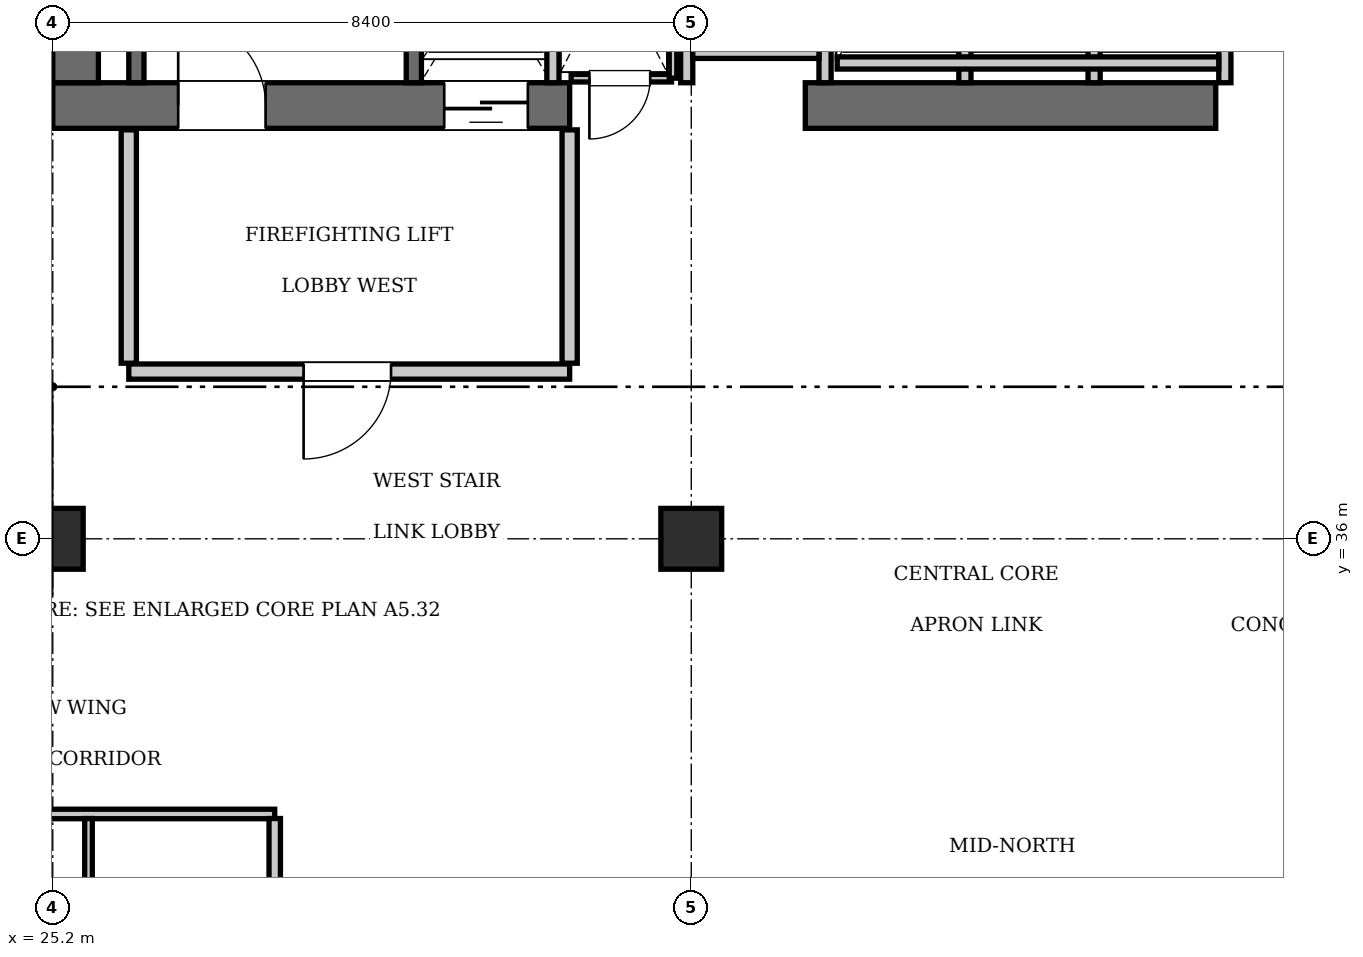
"""IFC4 building model, lengths in metres.
Left out: names, types, materials, properties, quantities, classifications, styles, units other than length and angle.
Written with IfcOpenShell. Run it as: python <this file> out.ifc"""

import sys

from ifc_helpers import new_model, si_unit, direction, frame, frame_2d, origin, origin_2d, place, context, subcontext, project, spatial, rectangle, extrude, element, fill, save


model = new_model("IFC4")
c1 = context("Model", 3, precision=1e-05, world=origin(), true_north=direction((0.0, 1.0)))
c2 = subcontext(c1, "Body", "Model", "MODEL_VIEW")
j1 = project(units=[si_unit("LENGTHUNIT", "METRE"), si_unit("PLANEANGLEUNIT", "RADIAN")], contexts=[c1])
p1 = place(None, origin())
s1 = spatial("IfcSite", under=j1, at=p1, CompositionType="ELEMENT")
p2 = place(p1, origin())
s2 = spatial("IfcBuilding", under=s1, at=p2, CompositionType="ELEMENT")
p3 = place(p2, frame((0.0, 0.0, 308.7)))
s3 = spatial("IfcBuildingStorey", under=s2, at=p3, CompositionType="ELEMENT", Elevation=308.7)
p4 = place(p3, frame((25.2, 41.7, 0.0), z_axis=(0.0, 0.0, 1.0), x_axis=(1.0, 0.0, 0.0)))
e1 = element("IfcWall", 1, at=p4, inside=s3, PredefinedType="SHEAR", context=c2, shape_type="SweptSolid", body=[
    extrude(rectangle(XDim=6.8, YDim=0.6, at=frame_2d((3.4, 0.0))), origin(), (0.0, 0.0, 1.0), 3.85),
])
p5 = place(p4, frame((1.65, 0.0, 0.0)))
e2 = element("IfcOpeningElement", 2, at=p5, cuts=e1, PredefinedType="OPENING", context=c2, shape_type="SweptSolid", body=[
    extrude(rectangle(XDim=1.15, YDim=2.15, at=frame_2d((0.575, 1.075))), frame((0.0, 0.31, 0.0), z_axis=(0.0, -1.0, 0.0), x_axis=(1.0, 0.0, 0.0)), (0.0, 0.0, 1.0), 0.62),
])
p6 = place(p4, frame((5.15, 0.0, 0.0)))
e3 = element("IfcOpeningElement", 3, at=p6, cuts=e1, PredefinedType="OPENING", context=c2, shape_type="SweptSolid", body=[
    extrude(rectangle(XDim=1.1, YDim=2.2, at=frame_2d((0.55, 1.1))), frame((0.0, 0.31, 0.0), z_axis=(0.0, -1.0, 0.0), x_axis=(1.0, 0.0, 0.0)), (0.0, 0.0, 1.0), 0.62),
])
p7 = place(p3, frame((35.1, 41.7, 0.0), z_axis=(0.0, 0.0, 1.0), x_axis=(1.0, 0.0, 0.0)))
e4 = element("IfcWall", 4, at=p7, inside=s3, PredefinedType="SHEAR", context=c2, shape_type="SweptSolid", body=[
    extrude(rectangle(XDim=5.4, YDim=0.6, at=frame_2d((2.7, 0.0))), origin(), (0.0, 0.0, 1.0), 3.85),
])
p8 = place(p3, frame((25.5, 42.0, 0.0), z_axis=(0.0, 0.0, 1.0), x_axis=(0.0, 1.0, 0.0)))
e5 = element("IfcWall", 5, at=p8, inside=s3, PredefinedType="SHEAR", context=c2, shape_type="SweptSolid", body=[
    extrude(rectangle(XDim=2.2, YDim=0.6, at=frame_2d((1.1, 0.0))), origin(), (0.0, 0.0, 1.0), 3.85),
])
for number, where, z_axis, x_axis in (
    (6, (25.2, 36.0, 0.0), (0.0, 0.0, 1.0), (1.0, 0.0, 0.0)),
    (7, (33.6, 36.0, 0.0), (0.0, 0.0, 1.0), (1.0, 0.0, 0.0)),
):
    element("IfcColumn", number, at=place(p3, frame(where, z_axis=z_axis, x_axis=x_axis)), inside=s3, PredefinedType="COLUMN", context=c2, shape_type="SweptSolid", body=[
        extrude(rectangle(XDim=0.8, YDim=0.8, at=origin_2d()), origin(), (0.0, 0.0, 1.0), 3.85),
    ])
p9 = place(p3, frame((29.95, 42.0, 0.0), z_axis=(0.0, 0.0, 1.0), x_axis=(0.0, 1.0, 0.0)))
e8 = element("IfcWall", 8, at=p9, inside=s3, PredefinedType="SOLIDWALL", context=c2, shape_type="SweptSolid", body=[
    extrude(rectangle(XDim=9.15, YDim=0.2, at=frame_2d((4.575, 0.0))), origin(), (0.0, 0.0, 1.0), 3.61),
])
p10 = place(p3, frame((26.3, 42.0, 0.0), z_axis=(0.0, 0.0, 1.0), x_axis=(0.0, 1.0, 0.0)))
e9 = element("IfcWall", 9, at=p10, inside=s3, PredefinedType="SOLIDWALL", context=c2, shape_type="SweptSolid", body=[
    extrude(rectangle(XDim=9.12, YDim=0.2, at=frame_2d((4.56, 0.0))), origin(), (0.0, 0.0, 1.0), 3.61),
])
p11 = place(p3, frame((31.78, 42.0, 0.0), z_axis=(0.0, 0.0, 1.0), x_axis=(0.0, 1.0, 0.0)))
e10 = element("IfcWall", 10, at=p11, inside=s3, PredefinedType="SOLIDWALL", context=c2, shape_type="SweptSolid", body=[
    extrude(rectangle(XDim=2.74, YDim=0.16, at=frame_2d((1.37, 0.0))), origin(), (0.0, 0.0, 1.0), 3.61),
])
for number, where, z_axis, x_axis in (
    (11, (37.2, 42.0, 0.0), (0.0, 0.0, 1.0), (0.0, 1.0, 0.0)),
    (12, (38.9, 42.0, 0.0), (0.0, 0.0, 1.0), (0.0, 1.0, 0.0)),
    (13, (40.62, 42.0, 0.0), (0.0, 0.0, 1.0), (0.0, 1.0, 0.0)),
):
    element("IfcWall", number, at=place(p3, frame(where, z_axis=z_axis, x_axis=x_axis)), inside=s3, PredefinedType="SOLIDWALL", context=c2, shape_type="SweptSolid", body=[
        extrude(rectangle(XDim=2.35, YDim=0.16, at=frame_2d((1.175, 0.0))), origin(), (0.0, 0.0, 1.0), 3.61),
    ])
p12 = place(p3, frame((35.52, 42.26, 0.0), z_axis=(0.0, 0.0, 1.0), x_axis=(1.0, 0.0, 0.0)))
e14 = element("IfcWall", 14, at=p12, inside=s3, PredefinedType="SOLIDWALL", context=c2, shape_type="SweptSolid", body=[
    extrude(rectangle(XDim=5.02, YDim=0.16, at=frame_2d((2.51, 0.0))), origin(), (0.0, 0.0, 1.0), 3.61),
])
for number, where, z_axis, x_axis in (
    (15, (33.54, 42.0, 0.0), (0.0, 0.0, 1.0), (0.0, 1.0, 0.0)),
    (16, (35.36, 42.0, 0.0), (0.0, 0.0, 1.0), (0.0, 1.0, 0.0)),
):
    element("IfcWall", number, at=place(p3, frame(where, z_axis=z_axis, x_axis=x_axis)), inside=s3, PredefinedType="SOLIDWALL", context=c2, shape_type="SweptSolid", body=[
        extrude(rectangle(XDim=2.4, YDim=0.16, at=frame_2d((1.2, 0.0))), origin(), (0.0, 0.0, 1.0), 3.61),
    ])
p13 = place(p3, frame((33.62, 42.4, 0.0), z_axis=(0.0, 0.0, 1.0), x_axis=(1.0, 0.0, 0.0)))
e17 = element("IfcWall", 17, at=p13, inside=s3, PredefinedType="SOLIDWALL", context=c2, shape_type="SweptSolid", body=[
    extrude(rectangle(XDim=1.66, YDim=0.16, at=frame_2d((0.83, 0.0))), origin(), (0.0, 0.0, 1.0), 3.61),
])
p14 = place(p3, frame((26.2, 38.2, 0.0), z_axis=(0.0, 0.0, 1.0), x_axis=(1.0, 0.0, 0.0)))
e18 = element("IfcWall", 18, at=p14, inside=s3, PredefinedType="PARTITIONING", context=c2, shape_type="SweptSolid", body=[
    extrude(rectangle(XDim=5.8, YDim=0.2, at=frame_2d((2.9, 0.0))), origin(), (0.0, 0.0, 1.0), 3.61),
])
p15 = place(p14, frame((2.3, 0.0, 0.0)))
e19 = element("IfcOpeningElement", 19, at=p15, cuts=e18, PredefinedType="OPENING", context=c2, shape_type="SweptSolid", body=[
    extrude(rectangle(XDim=1.15, YDim=2.15, at=frame_2d((0.575, 1.075))), frame((0.0, 0.11, 0.0), z_axis=(0.0, -1.0, 0.0), x_axis=(1.0, 0.0, 0.0)), (0.0, 0.0, 1.0), 0.22),
])
for number, where, z_axis, x_axis in (
    (20, (26.2, 38.31, 0.0), (0.0, 0.0, 1.0), (0.0, 1.0, 0.0)),
    (21, (32.0, 38.31, 0.0), (0.0, 0.0, 1.0), (0.0, 1.0, 0.0)),
):
    element("IfcWall", number, at=place(p3, frame(where, z_axis=z_axis, x_axis=x_axis)), inside=s3, PredefinedType="PARTITIONING", context=c2, shape_type="SweptSolid", body=[
        extrude(rectangle(XDim=3.07, YDim=0.2, at=frame_2d((1.535, 0.0))), origin(), (0.0, 0.0, 1.0), 3.61),
    ])
p16 = place(p3, frame((32.02, 42.06, 0.0), z_axis=(0.0, 0.0, 1.0), x_axis=(1.0, 0.0, 0.0)))
e22 = element("IfcWall", 22, at=p16, inside=s3, PredefinedType="PARTITIONING", context=c2, shape_type="SweptSolid", body=[
    extrude(rectangle(XDim=1.32, YDim=0.1, at=frame_2d((0.66, 0.0))), origin(), (0.0, 0.0, 1.0), 3.61),
])
p17 = place(p16, frame((0.24, 0.0, 0.0)))
e23 = element("IfcOpeningElement", 23, at=p17, cuts=e22, PredefinedType="OPENING", context=c2, shape_type="SweptSolid", body=[
    extrude(rectangle(XDim=0.8, YDim=2.05, at=frame_2d((0.4, 1.025))), frame((0.0, 0.06, 0.0), z_axis=(0.0, -1.0, 0.0), x_axis=(1.0, 0.0, 0.0)), (0.0, 0.0, 1.0), 0.12),
])
p18 = place(p3, frame((33.36, 42.06, 0.0), z_axis=(0.0, 0.0, 1.0), x_axis=(0.0, 1.0, 0.0)))
e24 = element("IfcWall", 24, at=p18, inside=s3, PredefinedType="PARTITIONING", context=c2, shape_type="SweptSolid", body=[
    extrude(rectangle(XDim=2.88, YDim=0.1, at=frame_2d((1.44, 0.0))), origin(), (0.0, 0.0, 1.0), 3.61),
])
p19 = place(p3, frame((15.5, 32.38, 0.0), z_axis=(0.0, 0.0, 1.0), x_axis=(1.0, 0.0, 0.0)))
e25 = element("IfcWall", 25, at=p19, inside=s3, PredefinedType="PARTITIONING", context=c2, shape_type="SweptSolid", body=[
    extrude(rectangle(XDim=12.62, YDim=0.125, at=frame_2d((6.31, 0.0))), origin(), (0.0, 0.0, 1.0), 3.61),
])
p20 = place(p3, frame((28.12, 30.43, 0.0), z_axis=(0.0, 0.0, 1.0), x_axis=(0.0, 1.0, 0.0)))
e26 = element("IfcWall", 26, at=p20, inside=s3, PredefinedType="PARTITIONING", context=c2, shape_type="SweptSolid", body=[
    extrude(rectangle(XDim=1.89, YDim=0.15, at=frame_2d((0.945, 0.0))), origin(), (0.0, 0.0, 1.0), 3.61),
])
p21 = place(p3, frame((25.67, 30.43, 0.0), z_axis=(0.0, 0.0, 1.0), x_axis=(0.0, 1.0, 0.0)))
e27 = element("IfcWall", 27, at=p21, inside=s3, PredefinedType="PARTITIONING", context=c2, shape_type="SweptSolid", body=[
    extrude(rectangle(XDim=1.89, YDim=0.1, at=frame_2d((0.945, 0.0))), origin(), (0.0, 0.0, 1.0), 3.61),
])
p22 = place(p5, origin())
e28 = element("IfcDoor", 28, at=p22, inside=s3, OperationType="SINGLE_SWING_LEFT", PredefinedType="DOOR", context=c2, shape_type="SweptSolid", body=[
    extrude(rectangle(XDim=1.15, YDim=2.15, at=frame_2d((0.575, 1.075))), frame((0.0, 0.025, 0.0), z_axis=(0.0, -1.0, 0.0), x_axis=(1.0, 0.0, 0.0)), (0.0, 0.0, 1.0), 0.05),
])
fill(e2, e28)
p23 = place(p6, frame((1.1, 0.0, 0.0), z_axis=(0.0, 0.0, 1.0), x_axis=(-1.0, 0.0, 0.0)))
e29 = element("IfcDoor", 29, at=p23, inside=s3, OperationType="SLIDING_TO_LEFT", PredefinedType="DOOR", context=c2, shape_type="SweptSolid", body=[
    extrude(rectangle(XDim=1.1, YDim=2.2, at=frame_2d((0.55, 1.1))), frame((0.0, 0.025, 0.0), z_axis=(0.0, -1.0, 0.0), x_axis=(1.0, 0.0, 0.0)), (0.0, 0.0, 1.0), 0.05),
])
fill(e3, e29)
p24 = place(p15, frame((1.15, 0.0, 0.0), z_axis=(0.0, 0.0, 1.0), x_axis=(-1.0, 0.0, 0.0)))
e30 = element("IfcDoor", 30, at=p24, inside=s3, OperationType="SINGLE_SWING_RIGHT", PredefinedType="DOOR", context=c2, shape_type="SweptSolid", body=[
    extrude(rectangle(XDim=1.15, YDim=2.15, at=frame_2d((0.575, 1.075))), frame((0.0, 0.025, 0.0), z_axis=(0.0, -1.0, 0.0), x_axis=(1.0, 0.0, 0.0)), (0.0, 0.0, 1.0), 0.05),
])
fill(e19, e30)
p25 = place(p17, frame((0.8, 0.0, 0.0), z_axis=(0.0, 0.0, 1.0), x_axis=(-1.0, 0.0, 0.0)))
e31 = element("IfcDoor", 31, at=p25, inside=s3, OperationType="SINGLE_SWING_RIGHT", PredefinedType="DOOR", context=c2, shape_type="SweptSolid", body=[
    extrude(rectangle(XDim=0.8, YDim=2.05, at=frame_2d((0.4, 1.025))), frame((0.0, 0.025, 0.0), z_axis=(0.0, -1.0, 0.0), x_axis=(1.0, 0.0, 0.0)), (0.0, 0.0, 1.0), 0.05),
])
fill(e23, e31)
save(model, sys.argv[1])
